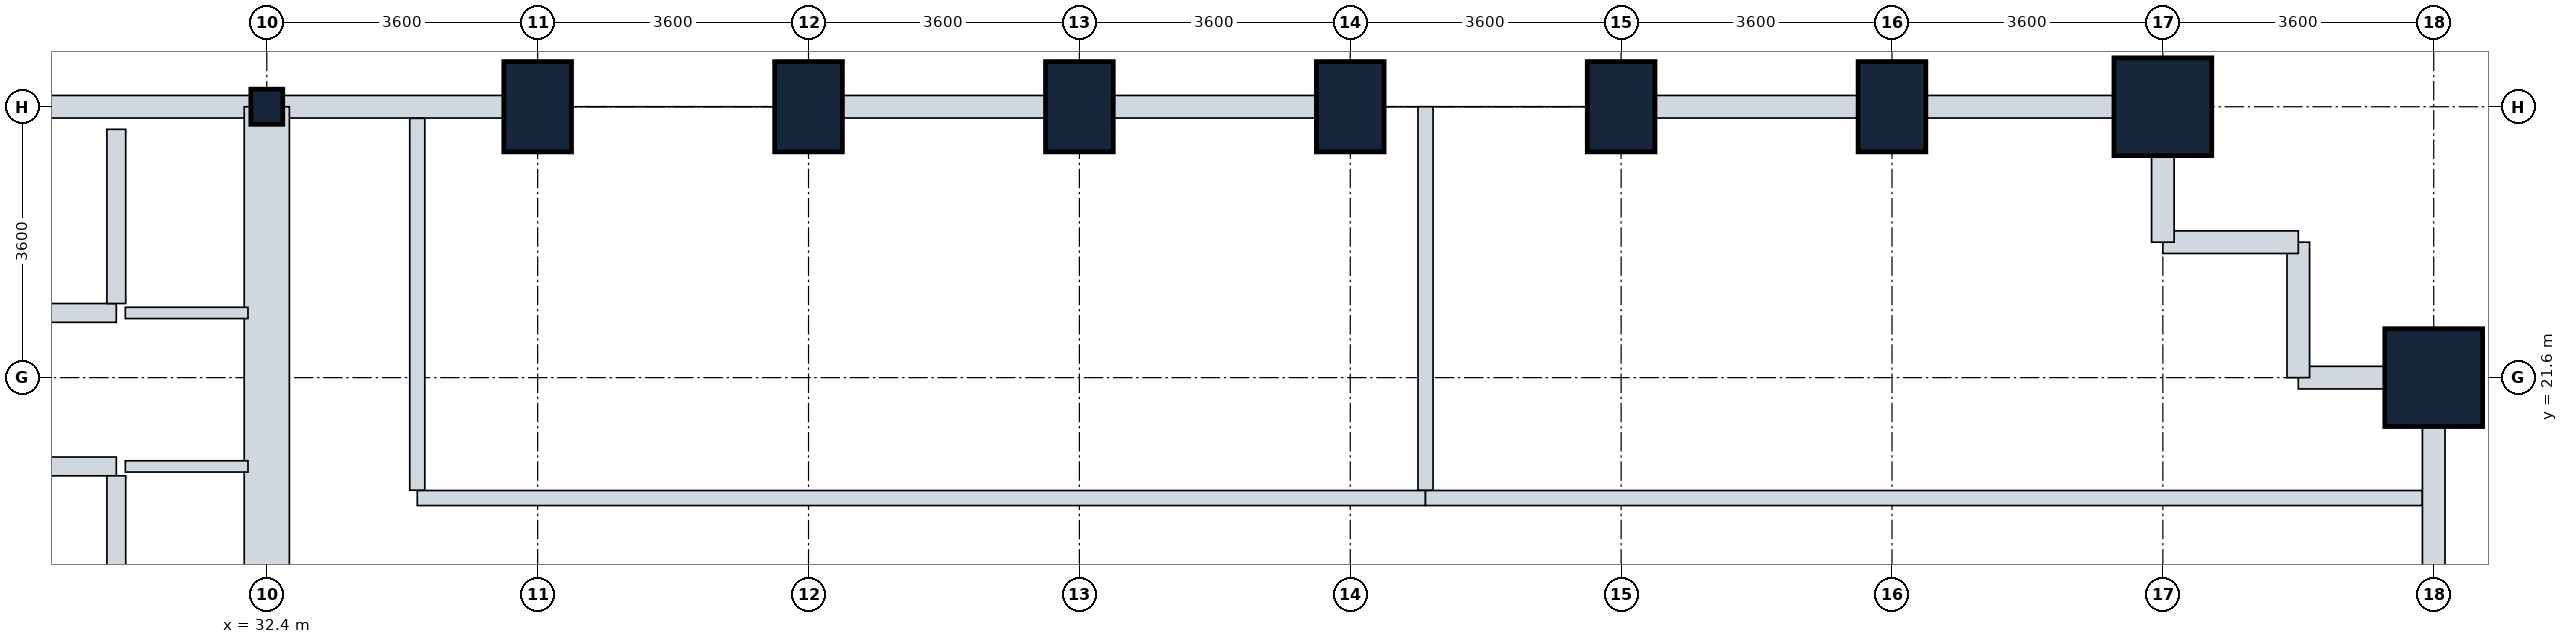
"""IFC4 building model, lengths in metres.
Left out: names, types, materials, properties, quantities, classifications, styles, units other than length and angle.
Written with IfcOpenShell. Run it as: python <this file> out.ifc"""

import sys

from ifc_helpers import new_model, si_unit, direction, frame, frame_2d, origin, origin_2d, place, context, subcontext, project, spatial, rectangle, i_section, extrude, element, fill, save


model = new_model("IFC4")
c1 = context("Model", 3, precision=1e-05, world=origin(), true_north=direction((0.0, 1.0)))
c2 = subcontext(c1, "Body", "Model", "MODEL_VIEW")
j1 = project(units=[si_unit("LENGTHUNIT", "METRE"), si_unit("PLANEANGLEUNIT", "RADIAN")], contexts=[c1])
p1 = place(None, origin())
s1 = spatial("IfcSite", under=j1, at=p1, CompositionType="ELEMENT")
p2 = place(p1, origin())
s2 = spatial("IfcBuilding", under=s1, at=p2, CompositionType="ELEMENT")
p3 = place(p2, frame((0.0, 0.0, 74.7)))
s3 = spatial("IfcBuildingStorey", under=s2, at=p3, CompositionType="ELEMENT", Elevation=74.7)
p4 = place(p3, frame((32.4, 25.2, 0.0), z_axis=(0.0, 0.0, 1.0), x_axis=(1.0, 0.0, 0.0)))
e1 = element("IfcColumn", 1, at=p4, inside=s3, PredefinedType="COLUMN", context=c2, shape_type="SweptSolid", body=[
    extrude(i_section(OverallWidth=0.424, OverallDepth=0.467, WebThickness=0.033, FlangeThickness=0.053, FilletRadius=0.015, at=origin_2d()), origin(), (0.0, 0.0, 1.0), 5.4),
])
for number, where, z_axis, x_axis in (
    (2, (36.0, 25.2, 0.0), (0.0, 0.0, 1.0), (1.0, 0.0, 0.0)),
    (3, (39.6, 25.2, 0.0), (0.0, 0.0, 1.0), (1.0, 0.0, 0.0)),
    (4, (43.2, 25.2, 0.0), (0.0, 0.0, 1.0), (1.0, 0.0, 0.0)),
    (5, (46.8, 25.2, 0.0), (0.0, 0.0, 1.0), (1.0, 0.0, 0.0)),
    (6, (50.4, 25.2, 0.0), (0.0, 0.0, 1.0), (1.0, 0.0, 0.0)),
    (7, (54.0, 25.2, 0.0), (0.0, 0.0, 1.0), (1.0, 0.0, 0.0)),
):
    element("IfcColumn", number, at=place(p3, frame(where, z_axis=z_axis, x_axis=x_axis)), inside=s3, PredefinedType="COLUMN", context=c2, shape_type="SweptSolid", body=[
        extrude(rectangle(XDim=0.9, YDim=1.2, at=origin_2d()), origin(), (0.0, 0.0, 1.0), 5.4),
    ])
for number, where, z_axis, x_axis in (
    (8, (57.6, 25.2, 0.0), (0.0, 0.0, 1.0), (1.0, 0.0, 0.0)),
    (9, (61.2, 21.6, 0.0), (0.0, 0.0, 1.0), (0.0, 1.0, 0.0)),
):
    element("IfcColumn", number, at=place(p3, frame(where, z_axis=z_axis, x_axis=x_axis)), inside=s3, PredefinedType="COLUMN", context=c2, shape_type="SweptSolid", body=[
        extrude(rectangle(XDim=1.3, YDim=1.3, at=origin_2d()), origin(), (0.0, 0.0, 1.0), 5.4),
    ])
p5 = place(p3, frame((61.2, 21.6, 0.0), z_axis=(0.0, 0.0, 1.0), x_axis=(0.0, -1.0, 0.0)))
e10 = element("IfcWall", 10, at=p5, inside=s3, PredefinedType="STANDARD", context=c2, shape_type="SweptSolid", body=[
    extrude(rectangle(XDim=3.6, YDim=0.3, at=frame_2d((1.8, 0.0))), origin(), (0.0, 0.0, 1.0), 4.03),
])
p6 = place(p3, frame((61.2, 21.6, 0.0), z_axis=(0.0, 0.0, 1.0), x_axis=(-1.0, 0.0, 0.0)))
e11 = element("IfcWall", 11, at=p6, inside=s3, PredefinedType="STANDARD", context=c2, shape_type="SweptSolid", body=[
    extrude(rectangle(XDim=1.8, YDim=0.3, at=frame_2d((0.9, 0.0))), origin(), (0.0, 0.0, 1.0), 4.03),
])
p7 = place(p3, frame((59.4, 23.4, 0.0), z_axis=(0.0, 0.0, 1.0), x_axis=(0.0, -1.0, 0.0)))
e12 = element("IfcWall", 12, at=p7, inside=s3, PredefinedType="STANDARD", context=c2, shape_type="SweptSolid", body=[
    extrude(rectangle(XDim=1.8, YDim=0.3, at=frame_2d((0.9, 0.0))), origin(), (0.0, 0.0, 1.0), 5.065),
])
p8 = place(p3, frame((57.6, 23.4, 0.0), z_axis=(0.0, 0.0, 1.0), x_axis=(1.0, 0.0, 0.0)))
e13 = element("IfcWall", 13, at=p8, inside=s3, PredefinedType="STANDARD", context=c2, shape_type="SweptSolid", body=[
    extrude(rectangle(XDim=1.8, YDim=0.3, at=frame_2d((0.9, 0.0))), origin(), (0.0, 0.0, 1.0), 3.58),
])
p9 = place(p3, frame((57.6, 25.2, 0.0), z_axis=(0.0, 0.0, 1.0), x_axis=(0.0, -1.0, 0.0)))
e14 = element("IfcWall", 14, at=p9, inside=s3, PredefinedType="STANDARD", context=c2, shape_type="SweptSolid", body=[
    extrude(rectangle(XDim=1.8, YDim=0.3, at=frame_2d((0.9, 0.0))), origin(), (0.0, 0.0, 1.0), 3.58),
])
p10 = place(p3, frame((54.0, 25.2, 0.0), z_axis=(0.0, 0.0, 1.0), x_axis=(1.0, 0.0, 0.0)))
e15 = element("IfcWall", 15, at=p10, inside=s3, PredefinedType="STANDARD", context=c2, shape_type="SweptSolid", body=[
    extrude(rectangle(XDim=3.6, YDim=0.3, at=frame_2d((1.8, 0.0))), origin(), (0.0, 0.0, 1.0), 3.58),
])
for number, where, z_axis, x_axis in (
    (16, (50.4, 25.2, 0.0), (0.0, 0.0, 1.0), (1.0, 0.0, 0.0)),
    (17, (43.2, 25.2, 0.0), (0.0, 0.0, 1.0), (1.0, 0.0, 0.0)),
):
    element("IfcWall", number, at=place(p3, frame(where, z_axis=z_axis, x_axis=x_axis)), inside=s3, PredefinedType="STANDARD", context=c2, shape_type="SweptSolid", body=[
        extrude(rectangle(XDim=3.6, YDim=0.3, at=frame_2d((1.8, 0.0))), origin(), (0.0, 0.0, 1.0), 4.43),
    ])
p11 = place(p3, frame((39.6, 25.2, 0.0), z_axis=(0.0, 0.0, 1.0), x_axis=(1.0, 0.0, 0.0)))
e18 = element("IfcWall", 18, at=p11, inside=s3, PredefinedType="STANDARD", context=c2, shape_type="SweptSolid", body=[
    extrude(rectangle(XDim=3.6, YDim=0.3, at=frame_2d((1.8, 0.0))), origin(), (0.0, 0.0, 1.0), 4.43),
])
p12 = place(p3, frame((32.4, 25.2, 0.0), z_axis=(0.0, 0.0, 1.0), x_axis=(1.0, 0.0, 0.0)))
e19 = element("IfcWall", 19, at=p12, inside=s3, PredefinedType="STANDARD", context=c2, shape_type="SweptSolid", body=[
    extrude(rectangle(XDim=3.6, YDim=0.3, at=frame_2d((1.8, 0.0))), origin(), (0.0, 0.0, 1.0), 4.43),
])
p13 = place(p3, frame((28.8, 25.2, 0.0), z_axis=(0.0, 0.0, 1.0), x_axis=(1.0, 0.0, 0.0)))
e20 = element("IfcWall", 20, at=p13, inside=s3, PredefinedType="STANDARD", context=c2, shape_type="SweptSolid", body=[
    extrude(rectangle(XDim=3.6, YDim=0.3, at=frame_2d((1.8, 0.0))), origin(), (0.0, 0.0, 1.0), 5.065),
])
p14 = place(p3, frame((32.4, 10.8, 0.0), z_axis=(0.0, 0.0, 1.0), x_axis=(0.0, 1.0, 0.0)))
e21 = element("IfcWall", 21, at=p14, inside=s3, PredefinedType="SHEAR", context=c2, shape_type="SweptSolid", body=[
    extrude(rectangle(XDim=14.4, YDim=0.6, at=frame_2d((7.2, 0.0))), origin(), (0.0, 0.0, 1.0), 5.08),
])
p15 = place(p14, frame((4.35, 0.0, 0.0)))
e22 = element("IfcOpeningElement", 22, at=p15, cuts=e21, PredefinedType="OPENING", context=c2, shape_type="SweptSolid", body=[
    extrude(rectangle(XDim=1.2, YDim=2.1, at=frame_2d((0.6, 1.05))), frame((0.0, 0.31, 0.0), z_axis=(0.0, -1.0, 0.0), x_axis=(1.0, 0.0, 0.0)), (0.0, 0.0, 1.0), 0.62),
])
p16 = place(p14, frame((10.0, 0.0, 0.0)))
e23 = element("IfcOpeningElement", 23, at=p16, cuts=e21, PredefinedType="OPENING", context=c2, shape_type="SweptSolid", body=[
    extrude(rectangle(XDim=1.2, YDim=2.1, at=frame_2d((0.6, 1.05))), frame((0.0, 0.31, 0.0), z_axis=(0.0, -1.0, 0.0), x_axis=(1.0, 0.0, 0.0)), (0.0, 0.0, 1.0), 0.62),
])
p17 = place(p3, frame((23.18, 20.42, 0.0), z_axis=(0.0, 0.0, 1.0), x_axis=(1.0, 0.0, 0.0)))
e24 = element("IfcWall", 24, at=p17, inside=s3, PredefinedType="PARTITIONING", context=c2, shape_type="SweptSolid", body=[
    extrude(rectangle(XDim=7.22, YDim=0.25, at=frame_2d((3.61, 0.0))), origin(), (0.0, 0.0, 1.0), 5.065),
])
p18 = place(p3, frame((30.4, 18.025, 0.0), z_axis=(0.0, 0.0, 1.0), x_axis=(0.0, 1.0, 0.0)))
e25 = element("IfcWall", 25, at=p18, inside=s3, PredefinedType="PARTITIONING", context=c2, shape_type="SweptSolid", body=[
    extrude(rectangle(XDim=2.27, YDim=0.25, at=frame_2d((1.135, 0.0))), origin(), (0.0, 0.0, 1.0), 5.065),
])
p19 = place(p3, frame((23.18, 22.46, 0.0), z_axis=(0.0, 0.0, 1.0), x_axis=(1.0, 0.0, 0.0)))
e26 = element("IfcWall", 26, at=p19, inside=s3, PredefinedType="PARTITIONING", context=c2, shape_type="SweptSolid", body=[
    extrude(rectangle(XDim=7.22, YDim=0.25, at=frame_2d((3.61, 0.0))), origin(), (0.0, 0.0, 1.0), 5.065),
])
p20 = place(p3, frame((30.4, 22.585, 0.0), z_axis=(0.0, 0.0, 1.0), x_axis=(0.0, 1.0, 0.0)))
e27 = element("IfcWall", 27, at=p20, inside=s3, PredefinedType="PARTITIONING", context=c2, shape_type="SweptSolid", body=[
    extrude(rectangle(XDim=2.315, YDim=0.25, at=frame_2d((1.157, 0.0))), origin(), (0.0, 0.0, 1.0), 5.065),
])
p21 = place(p3, frame((30.52, 22.46, 0.0), z_axis=(0.0, 0.0, 1.0), x_axis=(1.0, 0.0, 0.0)))
e28 = element("IfcWall", 28, at=p21, inside=s3, PredefinedType="PARTITIONING", context=c2, shape_type="SweptSolid", body=[
    extrude(rectangle(XDim=1.63, YDim=0.15, at=frame_2d((0.815, 0.0))), origin(), (0.0, 0.0, 1.0), 5.065),
])
p22 = place(p21, frame((0.38, 0.0, 0.0)))
e29 = element("IfcOpeningElement", 29, at=p22, cuts=e28, PredefinedType="OPENING", context=c2, shape_type="SweptSolid", body=[
    extrude(rectangle(XDim=0.85, YDim=2.1, at=frame_2d((0.425, 1.05))), frame((0.0, 0.085, 0.0), z_axis=(0.0, -1.0, 0.0), x_axis=(1.0, 0.0, 0.0)), (0.0, 0.0, 1.0), 0.17),
])
p23 = place(p3, frame((30.52, 20.42, 0.0), z_axis=(0.0, 0.0, 1.0), x_axis=(1.0, 0.0, 0.0)))
e30 = element("IfcWall", 30, at=p23, inside=s3, PredefinedType="PARTITIONING", context=c2, shape_type="SweptSolid", body=[
    extrude(rectangle(XDim=1.63, YDim=0.15, at=frame_2d((0.815, 0.0))), origin(), (0.0, 0.0, 1.0), 5.065),
])
p24 = place(p23, frame((0.38, 0.0, 0.0)))
e31 = element("IfcOpeningElement", 31, at=p24, cuts=e30, PredefinedType="OPENING", context=c2, shape_type="SweptSolid", body=[
    extrude(rectangle(XDim=0.85, YDim=2.1, at=frame_2d((0.425, 1.05))), frame((0.0, 0.085, 0.0), z_axis=(0.0, -1.0, 0.0), x_axis=(1.0, 0.0, 0.0)), (0.0, 0.0, 1.0), 0.17),
])
p25 = place(p3, frame((34.4, 20.0, 0.0), z_axis=(0.0, 0.0, 1.0), x_axis=(1.0, 0.0, 0.0)))
e32 = element("IfcWall", 32, at=p25, inside=s3, PredefinedType="PARTITIONING", context=c2, shape_type="SweptSolid", body=[
    extrude(rectangle(XDim=13.4, YDim=0.2, at=frame_2d((6.7, 0.0))), origin(), (0.0, 0.0, 1.0), 4.61),
])
p26 = place(p25, frame((5.8, 0.0, 0.0)))
e33 = element("IfcOpeningElement", 33, at=p26, cuts=e32, PredefinedType="OPENING", context=c2, shape_type="SweptSolid", body=[
    extrude(rectangle(XDim=1.8, YDim=2.2, at=frame_2d((0.9, 1.1))), frame((0.0, 0.11, 0.0), z_axis=(0.0, -1.0, 0.0), x_axis=(1.0, 0.0, 0.0)), (0.0, 0.0, 1.0), 0.22),
])
p27 = place(p3, frame((47.8, 20.0, 0.0), z_axis=(0.0, 0.0, 1.0), x_axis=(1.0, 0.0, 0.0)))
e34 = element("IfcWall", 34, at=p27, inside=s3, PredefinedType="PARTITIONING", context=c2, shape_type="SweptSolid", body=[
    extrude(rectangle(XDim=13.246, YDim=0.2, at=frame_2d((6.623, 0.0))), origin(), (0.0, 0.0, 1.0), 3.58),
])
p28 = place(p27, frame((6.2, 0.0, 0.0)))
e35 = element("IfcOpeningElement", 35, at=p28, cuts=e34, PredefinedType="OPENING", context=c2, shape_type="SweptSolid", body=[
    extrude(rectangle(XDim=1.0, YDim=2.1, at=frame_2d((0.5, 1.05))), frame((0.0, 0.11, 0.0), z_axis=(0.0, -1.0, 0.0), x_axis=(1.0, 0.0, 0.0)), (0.0, 0.0, 1.0), 0.22),
])
p29 = place(p3, frame((34.4, 20.104, 0.0), z_axis=(0.0, 0.0, 1.0), x_axis=(0.0, 1.0, 0.0)))
e36 = element("IfcWall", 36, at=p29, inside=s3, PredefinedType="PARTITIONING", context=c2, shape_type="SweptSolid", body=[
    extrude(rectangle(XDim=4.942, YDim=0.2, at=frame_2d((2.471, 0.0))), origin(), (0.0, 0.0, 1.0), 4.43),
])
p30 = place(p3, frame((47.8, 20.104, 0.0), z_axis=(0.0, 0.0, 1.0), x_axis=(0.0, 1.0, 0.0)))
e37 = element("IfcWall", 37, at=p30, inside=s3, PredefinedType="PARTITIONING", context=c2, shape_type="SweptSolid", body=[
    extrude(rectangle(XDim=5.096, YDim=0.2, at=frame_2d((2.548, 0.0))), origin(), (0.0, 0.0, 1.0), 4.43),
])
p31 = place(p16, origin())
e38 = element("IfcDoor", 38, at=p31, inside=s3, OperationType="SINGLE_SWING_RIGHT", PredefinedType="DOOR", context=c2, shape_type="SweptSolid", body=[
    extrude(rectangle(XDim=1.2, YDim=2.1, at=frame_2d((0.6, 1.05))), frame((0.0, 0.025, 0.0), z_axis=(0.0, -1.0, 0.0), x_axis=(1.0, 0.0, 0.0)), (0.0, 0.0, 1.0), 0.05),
])
fill(e23, e38)
p32 = place(p22, origin())
e39 = element("IfcDoor", 39, at=p32, inside=s3, OperationType="SINGLE_SWING_RIGHT", PredefinedType="DOOR", context=c2, shape_type="SweptSolid", body=[
    extrude(rectangle(XDim=0.85, YDim=2.1, at=frame_2d((0.425, 1.05))), frame((0.0, 0.025, 0.0), z_axis=(0.0, -1.0, 0.0), x_axis=(1.0, 0.0, 0.0)), (0.0, 0.0, 1.0), 0.05),
])
fill(e29, e39)
p33 = place(p24, origin())
e40 = element("IfcDoor", 40, at=p33, inside=s3, OperationType="SINGLE_SWING_LEFT", PredefinedType="DOOR", context=c2, shape_type="SweptSolid", body=[
    extrude(rectangle(XDim=0.85, YDim=2.1, at=frame_2d((0.425, 1.05))), frame((0.0, 0.025, 0.0), z_axis=(0.0, -1.0, 0.0), x_axis=(1.0, 0.0, 0.0)), (0.0, 0.0, 1.0), 0.05),
])
fill(e31, e40)
p34 = place(p26, origin())
e41 = element("IfcDoor", 41, at=p34, inside=s3, OperationType="DOUBLE_DOOR_SINGLE_SWING", PredefinedType="DOOR", context=c2, shape_type="SweptSolid", body=[
    extrude(rectangle(XDim=1.8, YDim=2.2, at=frame_2d((0.9, 1.1))), frame((0.0, 0.025, 0.0), z_axis=(0.0, -1.0, 0.0), x_axis=(1.0, 0.0, 0.0)), (0.0, 0.0, 1.0), 0.05),
])
fill(e33, e41)
p35 = place(p28, origin())
e42 = element("IfcDoor", 42, at=p35, inside=s3, OperationType="SINGLE_SWING_RIGHT", PredefinedType="DOOR", context=c2, shape_type="SweptSolid", body=[
    extrude(rectangle(XDim=1.0, YDim=2.1, at=frame_2d((0.5, 1.05))), frame((0.0, 0.025, 0.0), z_axis=(0.0, -1.0, 0.0), x_axis=(1.0, 0.0, 0.0)), (0.0, 0.0, 1.0), 0.05),
])
fill(e35, e42)
save(model, sys.argv[1])
